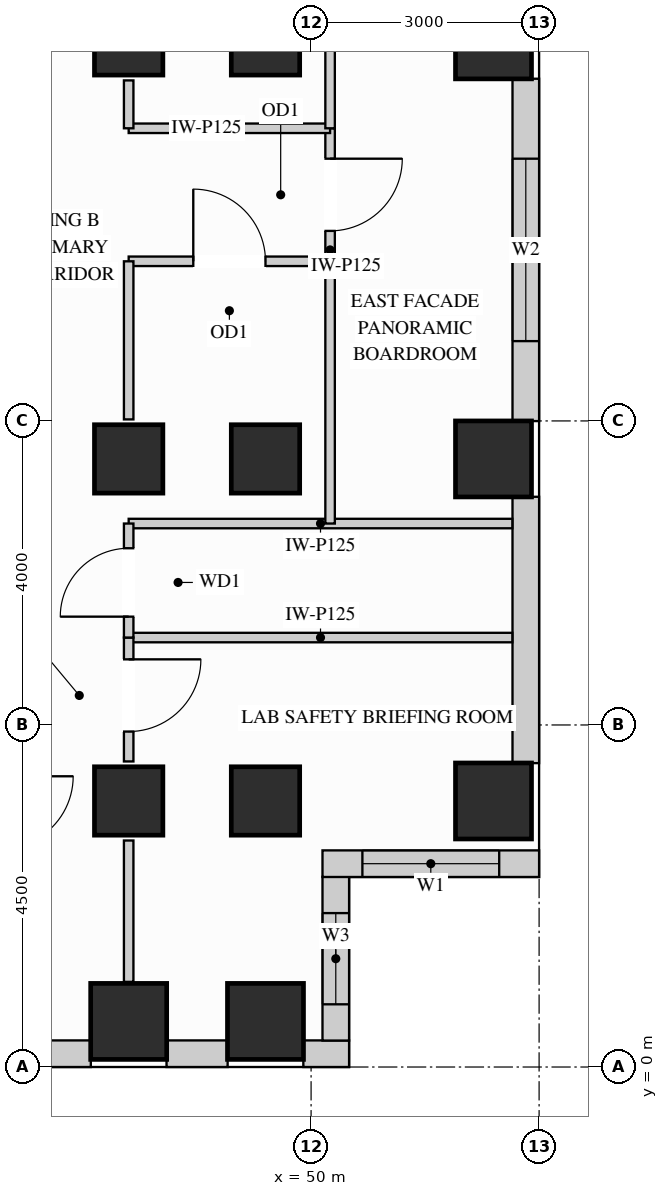
"""IFC4 building model, lengths in metres.
Left out: names, types, materials, properties, quantities, classifications, styles, units other than length and angle.
Written with IfcOpenShell. Run it as: python <this file> out.ifc"""

import sys

from ifc_helpers import new_model, si_unit, direction, frame, frame_2d, origin, origin_2d, place, context, subcontext, project, spatial, rectangle, extrude, source, transform, mapped, element, fill, save


model = new_model("IFC4")
c1 = context("Model", 3, precision=1e-05, world=origin(), true_north=direction((0.0, 1.0)))
c2 = subcontext(c1, "Body", "Model", "MODEL_VIEW")
j1 = project(units=[si_unit("LENGTHUNIT", "METRE"), si_unit("PLANEANGLEUNIT", "RADIAN")], contexts=[c1])
p1 = place(None, origin())
s1 = spatial("IfcSite", under=j1, at=p1, CompositionType="ELEMENT")
p2 = place(p1, origin())
s2 = spatial("IfcBuilding", under=s1, at=p2, CompositionType="ELEMENT")
p3 = place(p2, frame((0.0, 0.0, 186.3)))
s3 = spatial("IfcBuildingStorey", under=s2, at=p3, CompositionType="ELEMENT", Elevation=186.3)
m1 = source(origin(), c2, "Body", "SweptSolid", [
    extrude(rectangle(XDim=0.9, YDim=0.9, at=origin_2d()), origin(), (0.0, 0.0, 1.0), 3.4),
])
for number, where, z_axis, x_axis in (
    (1, (47.6, 13.5, 0.0), (0.0, 0.0, 1.0), (1.0, 0.0, 0.0)),
    (2, (47.6, 3.5, 0.0), (0.0, 0.0, 1.0), (1.0, 0.0, 0.0)),
    (3, (47.6, 8.0, 0.0), (0.0, 0.0, 1.0), (1.0, 0.0, 0.0)),
    (4, (49.4, 13.5, 0.0), (0.0, 0.0, 1.0), (1.0, 0.0, 0.0)),
    (5, (49.4, 3.5, 0.0), (0.0, 0.0, 1.0), (1.0, 0.0, 0.0)),
    (6, (49.4, 8.0, 0.0), (0.0, 0.0, 1.0), (1.0, 0.0, 0.0)),
):
    element("IfcColumn", number, at=place(p3, frame(where, z_axis=z_axis, x_axis=x_axis)), inside=s3, PredefinedType="COLUMN", context=c2, shape_type="MappedRepresentation", body=[
        mapped(m1, transform((0.0, 0.0, 0.0), x_axis=(1.0, 0.0, 0.0), y_axis=(0.0, 1.0, 0.0), z_axis=(0.0, 0.0, 1.0))),
    ])
m2 = source(origin(), c2, "Body", "SweptSolid", [
    extrude(rectangle(XDim=1.0, YDim=1.0, at=origin_2d()), origin(), (0.0, 0.0, 1.0), 3.4),
])
for number, where, z_axis, x_axis in (
    (7, (52.4, 13.5, 0.0), (0.0, 0.0, 1.0), (1.0, 0.0, 0.0)),
    (8, (52.4, 3.5, 0.0), (0.0, 0.0, 1.0), (1.0, 0.0, 0.0)),
    (9, (52.4, 8.0, 0.0), (0.0, 0.0, 1.0), (1.0, 0.0, 0.0)),
    (10, (47.6, 0.6, 0.0), (0.0, 0.0, 1.0), (1.0, 0.0, 0.0)),
    (11, (49.4, 0.6, 0.0), (0.0, 0.0, 1.0), (1.0, 0.0, 0.0)),
):
    element("IfcColumn", number, at=place(p3, frame(where, z_axis=z_axis, x_axis=x_axis)), inside=s3, PredefinedType="COLUMN", context=c2, shape_type="MappedRepresentation", body=[
        mapped(m2, transform((0.0, 0.0, 0.0), x_axis=(1.0, 0.0, 0.0), y_axis=(0.0, 1.0, 0.0), z_axis=(0.0, 0.0, 1.0))),
    ])
p4 = place(p3, frame((40.498, 0.175, 0.0), z_axis=(0.0, 0.0, 1.0), x_axis=(1.0, 0.0, 0.0)))
e12 = element("IfcWall", 12, at=p4, inside=s3, PredefinedType="SOLIDWALL", context=c2, shape_type="SweptSolid", body=[
    extrude(rectangle(XDim=6.604, YDim=0.35, at=frame_2d((3.302, 0.0))), origin(), (0.0, 0.0, 1.0), 2.612),
])
p5 = place(p4, frame((0.737, 0.0, 0.78)))
e13 = element("IfcOpeningElement", 13, at=p5, cuts=e12, PredefinedType="OPENING", context=c2, shape_type="SweptSolid", body=[
    extrude(rectangle(XDim=1.8, YDim=1.652, at=frame_2d((0.9, 0.826))), frame((0.0, 0.185, 0.0), z_axis=(0.0, -1.0, 0.0), x_axis=(1.0, 0.0, 0.0)), (0.0, 0.0, 1.0), 0.37),
])
p6 = place(p4, frame((2.955, 0.0, 0.78)))
e14 = element("IfcOpeningElement", 14, at=p6, cuts=e12, PredefinedType="OPENING", context=c2, shape_type="SweptSolid", body=[
    extrude(rectangle(XDim=1.8, YDim=1.652, at=frame_2d((0.9, 0.826))), frame((0.0, 0.185, 0.0), z_axis=(0.0, -1.0, 0.0), x_axis=(1.0, 0.0, 0.0)), (0.0, 0.0, 1.0), 0.37),
])
m3 = source(origin(), c2, "Body", "SweptSolid", [
    extrude(rectangle(XDim=0.804, YDim=0.35, at=frame_2d((0.402, 0.0))), origin(), (0.0, 0.0, 1.0), 3.385),
])
p7 = place(p3, frame((48.098, 0.175, 0.0), z_axis=(0.0, 0.0, 1.0), x_axis=(1.0, 0.0, 0.0)))
e15 = element("IfcWall", 15, at=p7, inside=s3, PredefinedType="SOLIDWALL", context=c2, shape_type="MappedRepresentation", body=[
    mapped(m3, transform((0.0, 0.0, 0.0), x_axis=(1.0, 0.0, 0.0), y_axis=(0.0, 1.0, 0.0), z_axis=(0.0, 0.0, 1.0))),
])
m4 = source(origin(), c2, "Body", "SweptSolid", [
    extrude(rectangle(XDim=0.602, YDim=0.35, at=frame_2d((0.301, 0.0))), origin(), (0.0, 0.0, 1.0), 3.385),
])
p8 = place(p3, frame((49.898, 0.175, 0.0), z_axis=(0.0, 0.0, 1.0), x_axis=(1.0, 0.0, 0.0)))
e16 = element("IfcWall", 16, at=p8, inside=s3, PredefinedType="SOLIDWALL", context=c2, shape_type="MappedRepresentation", body=[
    mapped(m4, transform((0.0, 0.0, 0.0), x_axis=(1.0, 0.0, 0.0), y_axis=(0.0, 1.0, 0.0), z_axis=(0.0, 0.0, 1.0))),
])
p9 = place(p3, frame((50.325, 0.348, 0.0), z_axis=(0.0, 0.0, 1.0), x_axis=(0.0, 1.0, 0.0)))
e17 = element("IfcWall", 17, at=p9, inside=s3, PredefinedType="SOLIDWALL", context=c2, shape_type="SweptSolid", body=[
    extrude(rectangle(XDim=2.154, YDim=0.35, at=frame_2d((1.077, 0.0))), origin(), (0.0, 0.0, 1.0), 3.385),
])
p10 = place(p9, frame((0.477, 0.0, 0.78)))
e18 = element("IfcOpeningElement", 18, at=p10, cuts=e17, PredefinedType="OPENING", context=c2, shape_type="SweptSolid", body=[
    extrude(rectangle(XDim=1.2, YDim=2.1, at=frame_2d((0.6, 1.05))), frame((0.0, 0.185, 0.0), z_axis=(0.0, -1.0, 0.0), x_axis=(1.0, 0.0, 0.0)), (0.0, 0.0, 1.0), 0.37),
])
p11 = place(p3, frame((50.15, 2.675, 0.0), z_axis=(0.0, 0.0, 1.0), x_axis=(1.0, 0.0, 0.0)))
e19 = element("IfcWall", 19, at=p11, inside=s3, PredefinedType="SOLIDWALL", context=c2, shape_type="SweptSolid", body=[
    extrude(rectangle(XDim=2.85, YDim=0.35, at=frame_2d((1.425, 0.0))), origin(), (0.0, 0.0, 1.0), 3.385),
])
p12 = place(p11, frame((0.525, 0.0, 0.78)))
e20 = element("IfcOpeningElement", 20, at=p12, cuts=e19, PredefinedType="OPENING", context=c2, shape_type="SweptSolid", body=[
    extrude(rectangle(XDim=1.8, YDim=2.1, at=frame_2d((0.9, 1.05))), frame((0.0, 0.185, 0.0), z_axis=(0.0, -1.0, 0.0), x_axis=(1.0, 0.0, 0.0)), (0.0, 0.0, 1.0), 0.37),
])
m5 = source(origin(), c2, "Body", "SweptSolid", [
    extrude(rectangle(XDim=3.504, YDim=0.35, at=frame_2d((1.752, 0.0))), origin(), (0.0, 0.0, 1.0), 2.612),
])
p13 = place(p3, frame((52.825, 3.998, 0.0), z_axis=(0.0, 0.0, 1.0), x_axis=(0.0, 1.0, 0.0)))
e21 = element("IfcWall", 21, at=p13, inside=s3, PredefinedType="SOLIDWALL", context=c2, shape_type="MappedRepresentation", body=[
    mapped(m5, transform((0.0, 0.0, 0.0), x_axis=(1.0, 0.0, 0.0), y_axis=(0.0, 1.0, 0.0), z_axis=(0.0, 0.0, 1.0))),
])
p14 = place(p3, frame((52.825, 8.498, 0.0), z_axis=(0.0, 0.0, 1.0), x_axis=(0.0, 1.0, 0.0)))
e22 = element("IfcWall", 22, at=p14, inside=s3, PredefinedType="SOLIDWALL", context=c2, shape_type="SweptSolid", body=[
    extrude(rectangle(XDim=4.504, YDim=0.35, at=frame_2d((2.252, 0.0))), origin(), (0.0, 0.0, 1.0), 2.612),
])
p15 = place(p14, frame((1.052, 0.0, 0.78)))
e23 = element("IfcOpeningElement", 23, at=p15, cuts=e22, PredefinedType="OPENING", context=c2, shape_type="SweptSolid", body=[
    extrude(rectangle(XDim=2.4, YDim=1.652, at=frame_2d((1.2, 0.826))), frame((0.0, 0.185, 0.0), z_axis=(0.0, -1.0, 0.0), x_axis=(1.0, 0.0, 0.0)), (0.0, 0.0, 1.0), 0.37),
])
p16 = place(p3, frame((50.25, 10.6, 0.0), z_axis=(0.0, 0.0, 1.0), x_axis=(0.0, 1.0, 0.0)))
e24 = element("IfcWall", 24, at=p16, inside=s3, PredefinedType="PARTITIONING", context=c2, shape_type="SweptSolid", body=[
    extrude(rectangle(XDim=1.75, YDim=0.125, at=frame_2d((0.875, 0.0))), origin(), (0.0, 0.0, 1.0), 3.385),
])
p17 = place(p16, frame((0.4, 0.0, 0.0)))
e25 = element("IfcOpeningElement", 25, at=p17, cuts=e24, PredefinedType="OPENING", context=c2, shape_type="SweptSolid", body=[
    extrude(rectangle(XDim=0.95, YDim=2.15, at=frame_2d((0.475, 1.075))), frame((0.0, 0.073, 0.0), z_axis=(0.0, -1.0, 0.0), x_axis=(1.0, 0.0, 0.0)), (0.0, 0.0, 1.0), 0.145),
])
m6 = source(origin(), c2, "Body", "SweptSolid", [
    extrude(rectangle(XDim=5.048, YDim=0.125, at=frame_2d((2.524, 0.0))), origin(), (0.0, 0.0, 1.0), 3.385),
])
for number, where, z_axis, x_axis in (
    (26, (47.6, 5.65, 0.0), (0.0, 0.0, 1.0), (1.0, 0.0, 0.0)),
    (27, (47.6, 7.15, 0.0), (0.0, 0.0, 1.0), (1.0, 0.0, 0.0)),
):
    element("IfcWall", number, at=place(p3, frame(where, z_axis=z_axis, x_axis=x_axis)), inside=s3, PredefinedType="PARTITIONING", context=c2, shape_type="MappedRepresentation", body=[
        mapped(m6, transform((0.0, 0.0, 0.0), x_axis=(1.0, 0.0, 0.0), y_axis=(0.0, 1.0, 0.0), z_axis=(0.0, 0.0, 1.0))),
    ])
m7 = source(origin(), c2, "Body", "SweptSolid", [
    extrude(rectangle(XDim=2.65, YDim=0.125, at=frame_2d((1.325, 0.0))), origin(), (0.0, 0.0, 1.0), 3.385),
])
p18 = place(p3, frame((47.6, 12.35, 0.0), z_axis=(0.0, 0.0, 1.0), x_axis=(1.0, 0.0, 0.0)))
e28 = element("IfcWall", 28, at=p18, inside=s3, PredefinedType="PARTITIONING", context=c2, shape_type="MappedRepresentation", body=[
    mapped(m7, transform((0.0, 0.0, 0.0), x_axis=(1.0, 0.0, 0.0), y_axis=(0.0, 1.0, 0.0), z_axis=(0.0, 0.0, 1.0))),
])
p19 = place(p3, frame((47.6, 10.6, 0.0), z_axis=(0.0, 0.0, 1.0), x_axis=(1.0, 0.0, 0.0)))
e29 = element("IfcWall", 29, at=p19, inside=s3, PredefinedType="PARTITIONING", context=c2, shape_type="SweptSolid", body=[
    extrude(rectangle(XDim=2.65, YDim=0.125, at=frame_2d((1.325, 0.0))), origin(), (0.0, 0.0, 1.0), 2.773),
])
p20 = place(p19, frame((0.85, 0.0, 0.0)))
e30 = element("IfcOpeningElement", 30, at=p20, cuts=e29, PredefinedType="OPENING", context=c2, shape_type="SweptSolid", body=[
    extrude(rectangle(XDim=0.95, YDim=2.15, at=frame_2d((0.475, 1.075))), frame((0.0, 0.073, 0.0), z_axis=(0.0, -1.0, 0.0), x_axis=(1.0, 0.0, 0.0)), (0.0, 0.0, 1.0), 0.145),
])
m8 = source(origin(), c2, "Body", "SweptSolid", [
    extrude(rectangle(XDim=3.45, YDim=0.125, at=frame_2d((1.725, 0.0))), origin(), (0.0, 0.0, 1.0), 3.385),
])
p21 = place(p3, frame((50.25, 7.15, 0.0), z_axis=(0.0, 0.0, 1.0), x_axis=(0.0, 1.0, 0.0)))
e31 = element("IfcWall", 31, at=p21, inside=s3, PredefinedType="PARTITIONING", context=c2, shape_type="MappedRepresentation", body=[
    mapped(m8, transform((0.0, 0.0, 0.0), x_axis=(1.0, 0.0, 0.0), y_axis=(0.0, 1.0, 0.0), z_axis=(0.0, 0.0, 1.0))),
])
m9 = source(origin(), c2, "Body", "SweptSolid", [
    extrude(rectangle(XDim=2.798, YDim=0.125, at=frame_2d((1.399, 0.0))), origin(), (0.0, 0.0, 1.0), 3.385),
])
p22 = place(p3, frame((50.25, 12.35, 0.0), z_axis=(0.0, 0.0, 1.0), x_axis=(0.0, 1.0, 0.0)))
e32 = element("IfcWall", 32, at=p22, inside=s3, PredefinedType="PARTITIONING", context=c2, shape_type="MappedRepresentation", body=[
    mapped(m9, transform((0.0, 0.0, 0.0), x_axis=(1.0, 0.0, 0.0), y_axis=(0.0, 1.0, 0.0), z_axis=(0.0, 0.0, 1.0))),
])
p23 = place(p3, frame((47.6, 4.02, 0.0), z_axis=(0.0, 0.0, 1.0), x_axis=(0.0, 1.0, 0.0)))
e33 = element("IfcWall", 33, at=p23, inside=s3, PredefinedType="PARTITIONING", context=c2, shape_type="SweptSolid", body=[
    extrude(rectangle(XDim=1.63, YDim=0.125, at=frame_2d((0.815, 0.0))), origin(), (0.0, 0.0, 1.0), 2.773),
])
p24 = place(p23, frame((0.393, 0.0, 0.0)))
e34 = element("IfcOpeningElement", 34, at=p24, cuts=e33, PredefinedType="OPENING", context=c2, shape_type="SweptSolid", body=[
    extrude(rectangle(XDim=0.95, YDim=2.15, at=frame_2d((0.475, 1.075))), frame((0.0, 0.073, 0.0), z_axis=(0.0, -1.0, 0.0), x_axis=(1.0, 0.0, 0.0)), (0.0, 0.0, 1.0), 0.145),
])
m10 = source(origin(), c2, "Body", "SweptSolid", [
    extrude(rectangle(XDim=1.86, YDim=0.125, at=frame_2d((0.93, 0.0))), origin(), (0.0, 0.0, 1.0), 2.773),
])
p25 = place(p3, frame((47.6, 1.12, 0.0), z_axis=(0.0, 0.0, 1.0), x_axis=(0.0, 1.0, 0.0)))
e35 = element("IfcWall", 35, at=p25, inside=s3, PredefinedType="PARTITIONING", context=c2, shape_type="MappedRepresentation", body=[
    mapped(m10, transform((0.0, 0.0, 0.0), x_axis=(1.0, 0.0, 0.0), y_axis=(0.0, 1.0, 0.0), z_axis=(0.0, 0.0, 1.0))),
])
m11 = source(origin(), c2, "Body", "SweptSolid", [
    extrude(rectangle(XDim=2.08, YDim=0.125, at=frame_2d((1.04, 0.0))), origin(), (0.0, 0.0, 1.0), 2.773),
])
p26 = place(p3, frame((47.6, 8.52, 0.0), z_axis=(0.0, 0.0, 1.0), x_axis=(0.0, 1.0, 0.0)))
e36 = element("IfcWall", 36, at=p26, inside=s3, PredefinedType="PARTITIONING", context=c2, shape_type="MappedRepresentation", body=[
    mapped(m11, transform((0.0, 0.0, 0.0), x_axis=(1.0, 0.0, 0.0), y_axis=(0.0, 1.0, 0.0), z_axis=(0.0, 0.0, 1.0))),
])
m12 = source(origin(), c2, "Body", "SweptSolid", [
    extrude(rectangle(XDim=0.63, YDim=0.125, at=frame_2d((0.315, 0.0))), origin(), (0.0, 0.0, 1.0), 2.773),
])
p27 = place(p3, frame((47.6, 12.35, 0.0), z_axis=(0.0, 0.0, 1.0), x_axis=(0.0, 1.0, 0.0)))
e37 = element("IfcWall", 37, at=p27, inside=s3, PredefinedType="PARTITIONING", context=c2, shape_type="MappedRepresentation", body=[
    mapped(m12, transform((0.0, 0.0, 0.0), x_axis=(1.0, 0.0, 0.0), y_axis=(0.0, 1.0, 0.0), z_axis=(0.0, 0.0, 1.0))),
])
p28 = place(p3, frame((47.6, 5.65, 0.0), z_axis=(0.0, 0.0, 1.0), x_axis=(0.0, 1.0, 0.0)))
e38 = element("IfcWall", 38, at=p28, inside=s3, PredefinedType="PARTITIONING", context=c2, shape_type="SweptSolid", body=[
    extrude(rectangle(XDim=1.5, YDim=0.125, at=frame_2d((0.75, 0.0))), origin(), (0.0, 0.0, 1.0), 2.773),
])
p29 = place(p28, frame((0.275, 0.0, 0.0)))
e39 = element("IfcOpeningElement", 39, at=p29, cuts=e38, PredefinedType="OPENING", context=c2, shape_type="SweptSolid", body=[
    extrude(rectangle(XDim=0.9, YDim=2.15, at=frame_2d((0.45, 1.075))), frame((0.0, 0.073, 0.0), z_axis=(0.0, -1.0, 0.0), x_axis=(1.0, 0.0, 0.0)), (0.0, 0.0, 1.0), 0.145),
])
m13 = source(origin(), c2, "Body", "SweptSolid", [
    extrude(rectangle(XDim=0.95, YDim=2.15, at=frame_2d((0.475, 1.075))), frame((0.0, 0.025, 0.0), z_axis=(0.0, -1.0, 0.0), x_axis=(1.0, 0.0, 0.0)), (0.0, 0.0, 1.0), 0.05),
])
p30 = place(p24, origin())
e40 = element("IfcDoor", 40, at=p30, inside=s3, OperationType="SINGLE_SWING_RIGHT", PredefinedType="DOOR", context=c2, shape_type="MappedRepresentation", body=[
    mapped(m13, transform((0.0, 0.0, 0.0), x_axis=(1.0, 0.0, 0.0), y_axis=(0.0, 1.0, 0.0), z_axis=(0.0, 0.0, 1.0))),
])
fill(e34, e40)
p31 = place(p20, origin())
e41 = element("IfcDoor", 41, at=p31, inside=s3, OperationType="SINGLE_SWING_LEFT", PredefinedType="DOOR", context=c2, shape_type="MappedRepresentation", body=[
    mapped(m13, transform((0.0, 0.0, 0.0), x_axis=(1.0, 0.0, 0.0), y_axis=(0.0, 1.0, 0.0), z_axis=(0.0, 0.0, 1.0))),
])
fill(e30, e41)
p32 = place(p17, origin())
e42 = element("IfcDoor", 42, at=p32, inside=s3, OperationType="SINGLE_SWING_RIGHT", PredefinedType="DOOR", context=c2, shape_type="MappedRepresentation", body=[
    mapped(m13, transform((0.0, 0.0, 0.0), x_axis=(1.0, 0.0, 0.0), y_axis=(0.0, 1.0, 0.0), z_axis=(0.0, 0.0, 1.0))),
])
fill(e25, e42)
m14 = source(origin(), c2, "Body", "SweptSolid", [
    extrude(rectangle(XDim=0.9, YDim=2.15, at=frame_2d((0.45, 1.075))), frame((0.0, 0.025, 0.0), z_axis=(0.0, -1.0, 0.0), x_axis=(1.0, 0.0, 0.0)), (0.0, 0.0, 1.0), 0.05),
])
p33 = place(p29, origin())
e43 = element("IfcDoor", 43, at=p33, inside=s3, OperationType="SINGLE_SWING_LEFT", PredefinedType="DOOR", context=c2, shape_type="MappedRepresentation", body=[
    mapped(m14, transform((0.0, 0.0, 0.0), x_axis=(1.0, 0.0, 0.0), y_axis=(0.0, 1.0, 0.0), z_axis=(0.0, 0.0, 1.0))),
])
fill(e39, e43)
m15 = source(origin(), c2, "Body", "SweptSolid", [
    extrude(rectangle(XDim=1.8, YDim=2.1, at=frame_2d((0.9, 1.05))), frame((0.0, 0.03, 0.0), z_axis=(0.0, -1.0, 0.0), x_axis=(1.0, 0.0, 0.0)), (0.0, 0.0, 1.0), 0.06),
])
p34 = place(p12, origin())
e44 = element("IfcWindow", 44, at=p34, inside=s3, PartitioningType="SINGLE_PANEL", PredefinedType="WINDOW", context=c2, shape_type="MappedRepresentation", body=[
    mapped(m15, transform((0.0, 0.0, 0.0), x_axis=(1.0, 0.0, 0.0), y_axis=(0.0, 1.0, 0.0), z_axis=(0.0, 0.0, 1.0))),
])
fill(e20, e44)
m16 = source(origin(), c2, "Body", "SweptSolid", [
    extrude(rectangle(XDim=2.4, YDim=1.652, at=frame_2d((1.2, 0.826))), frame((0.0, 0.03, 0.0), z_axis=(0.0, -1.0, 0.0), x_axis=(1.0, 0.0, 0.0)), (0.0, 0.0, 1.0), 0.06),
])
p35 = place(p15, origin())
e45 = element("IfcWindow", 45, at=p35, inside=s3, PartitioningType="SINGLE_PANEL", PredefinedType="WINDOW", context=c2, shape_type="MappedRepresentation", body=[
    mapped(m16, transform((0.0, 0.0, 0.0), x_axis=(1.0, 0.0, 0.0), y_axis=(0.0, 1.0, 0.0), z_axis=(0.0, 0.0, 1.0))),
])
fill(e23, e45)
m17 = source(origin(), c2, "Body", "SweptSolid", [
    extrude(rectangle(XDim=1.2, YDim=2.1, at=frame_2d((0.6, 1.05))), frame((0.0, 0.03, 0.0), z_axis=(0.0, -1.0, 0.0), x_axis=(1.0, 0.0, 0.0)), (0.0, 0.0, 1.0), 0.06),
])
p36 = place(p10, origin())
e46 = element("IfcWindow", 46, at=p36, inside=s3, PartitioningType="SINGLE_PANEL", PredefinedType="WINDOW", context=c2, shape_type="MappedRepresentation", body=[
    mapped(m17, transform((0.0, 0.0, 0.0), x_axis=(1.0, 0.0, 0.0), y_axis=(0.0, 1.0, 0.0), z_axis=(0.0, 0.0, 1.0))),
])
fill(e18, e46)
save(model, sys.argv[1])
